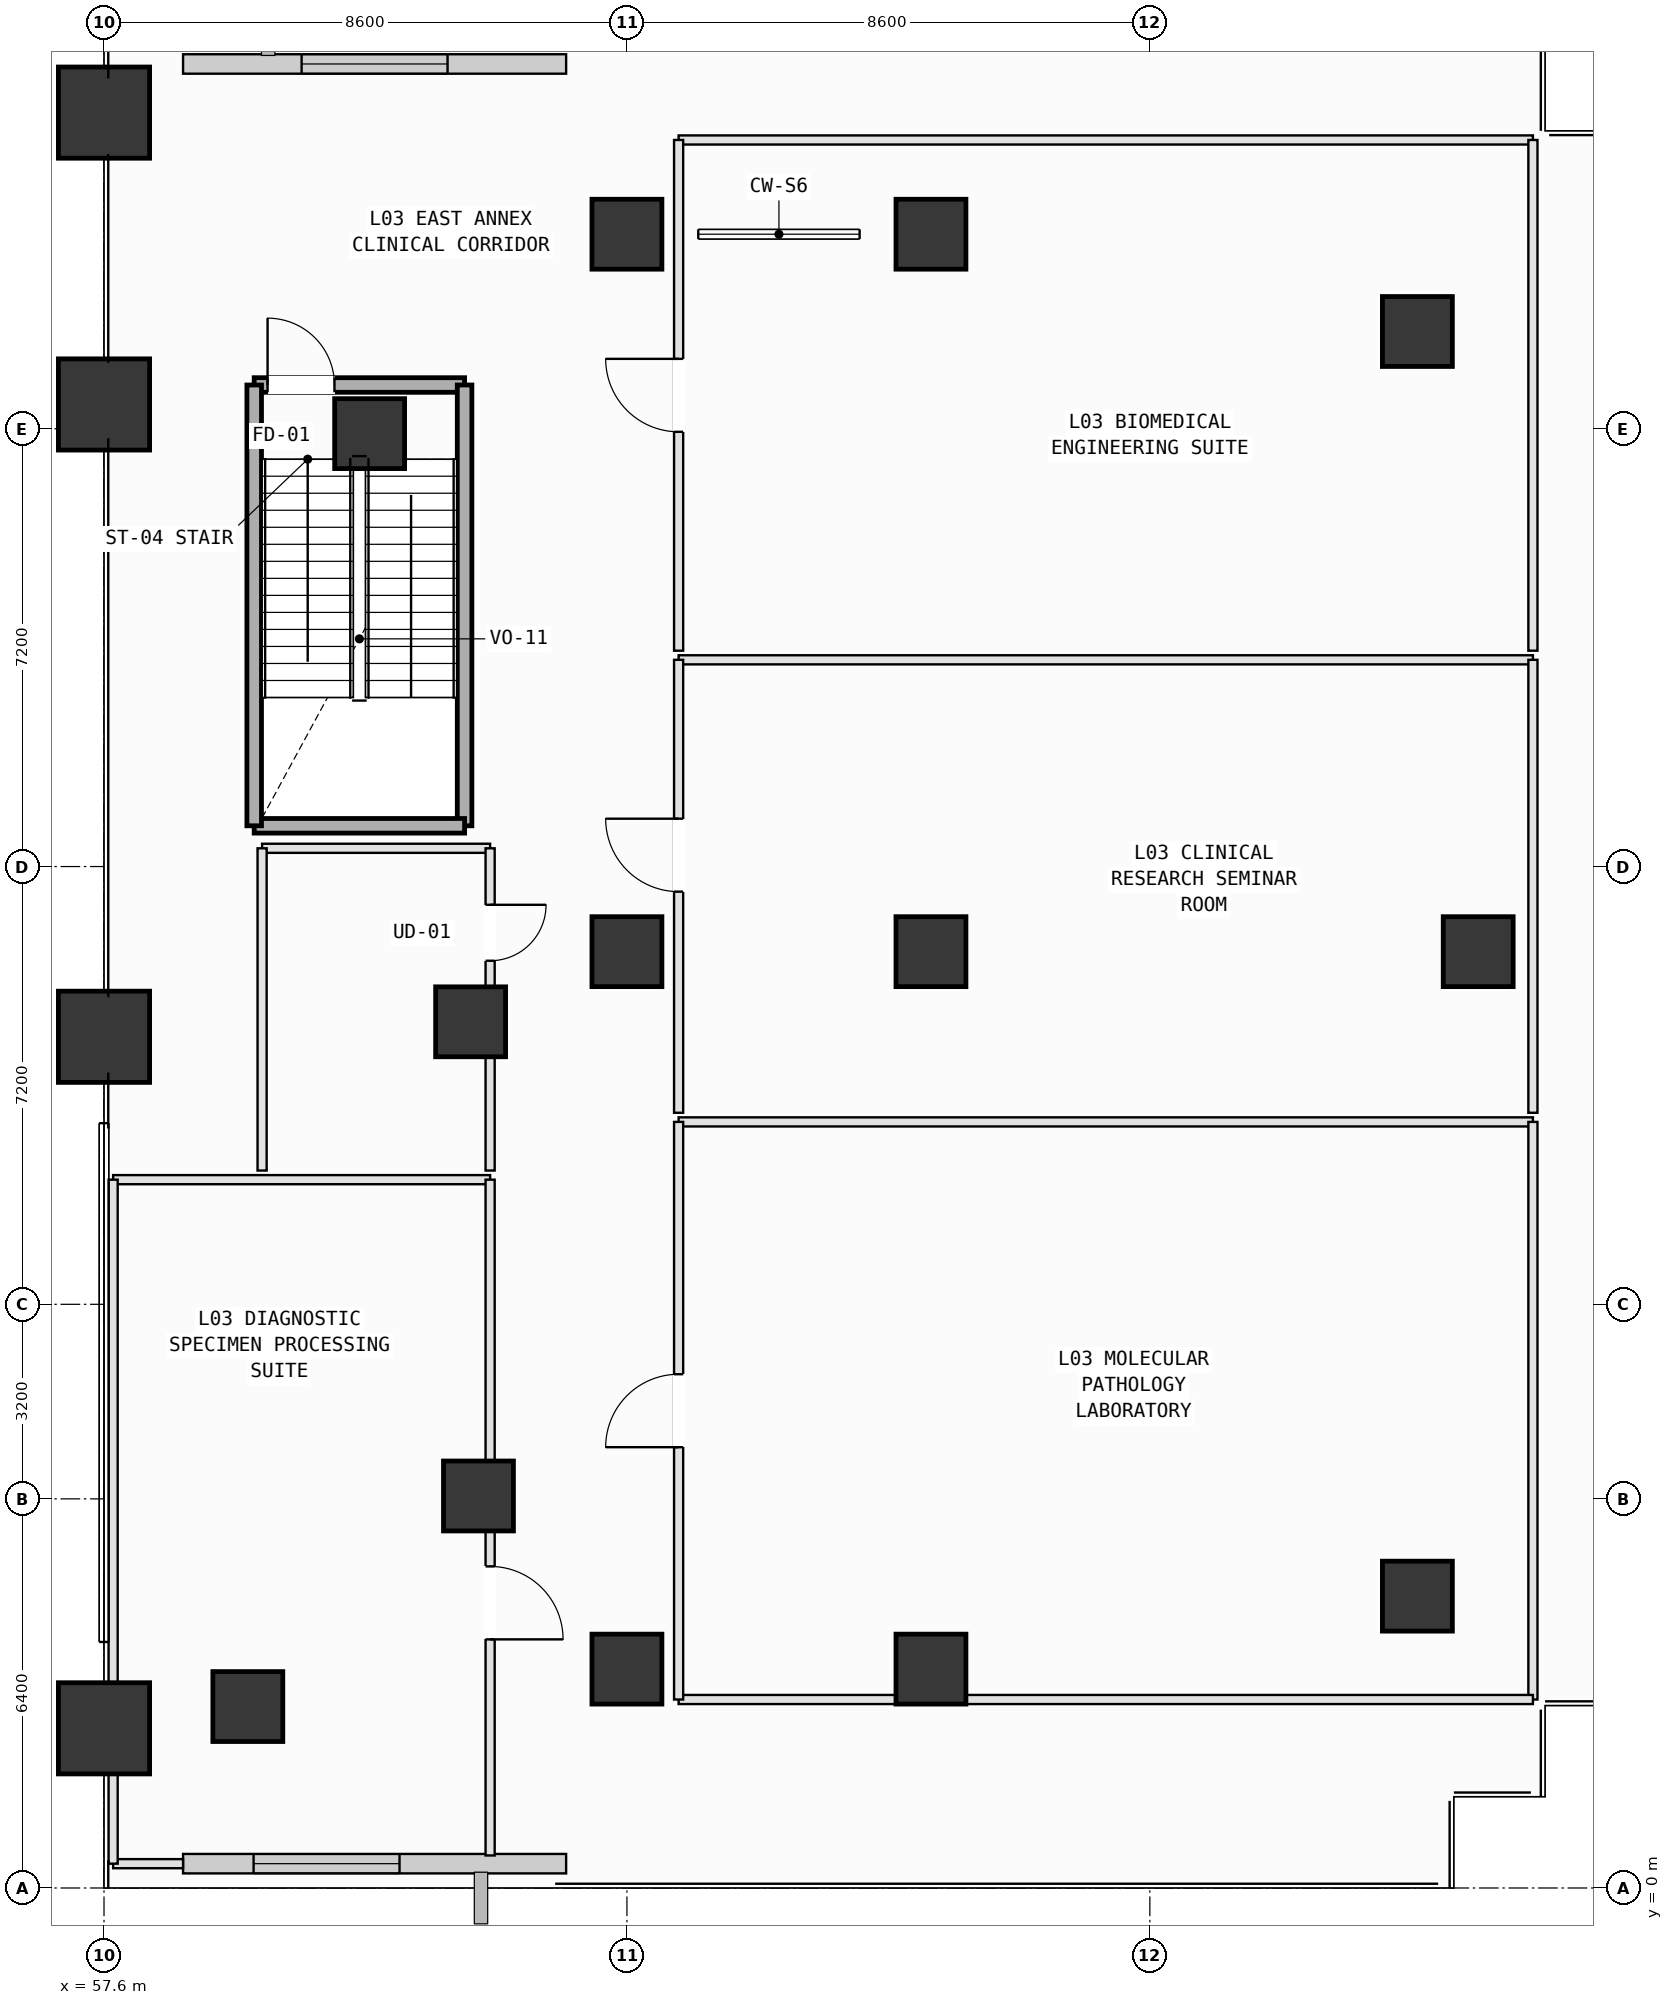
"""IFC4 building model, lengths in metres.
Left out: names, types, materials, properties, quantities, classifications, styles, units other than length and angle.
Written with IfcOpenShell. Run it as: python <this file> out.ifc"""

import sys

from ifc_helpers import new_model, si_unit, direction, frame, frame_2d, origin, origin_2d, place, context, subcontext, project, spatial, rectangle, extrude, element, fill, save


model = new_model("IFC4")
c1 = context("Model", 3, precision=1e-05, world=origin(), true_north=direction((0.0, 1.0)))
c2 = subcontext(c1, "Body", "Model", "MODEL_VIEW")
j1 = project(units=[si_unit("LENGTHUNIT", "METRE"), si_unit("PLANEANGLEUNIT", "RADIAN")], contexts=[c1])
p1 = place(None, origin())
s1 = spatial("IfcSite", under=j1, at=p1, CompositionType="ELEMENT")
p2 = place(p1, origin())
s2 = spatial("IfcBuilding", under=s1, at=p2, CompositionType="ELEMENT")
p3 = place(p2, frame((0.0, 0.0, 16.2)))
s3 = spatial("IfcBuildingStorey", under=s2, at=p3, CompositionType="ELEMENT", Elevation=16.2)
for number, where, z_axis, x_axis in (
    (1, (57.6, 2.626, 0.0), (0.0, 0.0, 1.0), (1.0, 0.0, 0.0)),
    (2, (57.6, 14.0, 0.0), (0.0, 0.0, 1.0), (1.0, 0.0, 0.0)),
    (3, (57.6, 24.4, 0.0), (0.0, 0.0, 1.0), (1.0, 0.0, 0.0)),
    (4, (57.6, 29.2, 0.0), (0.0, 0.0, 1.0), (1.0, 0.0, 0.0)),
):
    element("IfcColumn", number, at=place(p3, frame(where, z_axis=z_axis, x_axis=x_axis)), inside=s3, PredefinedType="PILASTER", context=c2, shape_type="SweptSolid", body=[
        extrude(rectangle(XDim=1.5, YDim=1.5, at=origin_2d()), origin(), (0.0, 0.0, 1.0), 5.4),
    ])
for number, where, z_axis, x_axis in (
    (5, (59.965, 2.984, 0.0), (0.0, 0.0, 1.0), (1.0, 0.0, 0.0)),
    (6, (63.758, 6.448, 0.0), (0.0, 0.0, 1.0), (1.0, 0.0, 0.0)),
    (7, (63.629, 14.246, 0.0), (0.0, 0.0, 1.0), (1.0, 0.0, 0.0)),
    (8, (61.969, 23.92, 0.0), (0.0, 0.0, 1.0), (1.0, 0.0, 0.0)),
    (9, (66.2, 3.6, 0.0), (0.0, 0.0, 1.0), (1.0, 0.0, 0.0)),
    (10, (71.2, 3.6, 0.0), (0.0, 0.0, 1.0), (1.0, 0.0, 0.0)),
    (11, (66.2, 15.4, 0.0), (0.0, 0.0, 1.0), (1.0, 0.0, 0.0)),
    (12, (71.2, 15.4, 0.0), (0.0, 0.0, 1.0), (1.0, 0.0, 0.0)),
    (13, (66.2, 27.2, 0.0), (0.0, 0.0, 1.0), (1.0, 0.0, 0.0)),
    (14, (71.2, 27.2, 0.0), (0.0, 0.0, 1.0), (1.0, 0.0, 0.0)),
    (15, (79.2, 4.8, 0.0), (0.0, 0.0, 1.0), (1.0, 0.0, 0.0)),
    (16, (80.2, 15.4, 0.0), (0.0, 0.0, 1.0), (1.0, 0.0, 0.0)),
    (17, (79.2, 25.6, 0.0), (0.0, 0.0, 1.0), (1.0, 0.0, 0.0)),
):
    element("IfcColumn", number, at=place(p3, frame(where, z_axis=z_axis, x_axis=x_axis)), inside=s3, PredefinedType="COLUMN", context=c2, shape_type="SweptSolid", body=[
        extrude(rectangle(XDim=1.15, YDim=1.15, at=origin_2d()), origin(), (0.0, 0.0, 1.0), 5.4),
    ])
p4 = place(p3, frame((65.2, 0.4, 0.0), z_axis=(0.0, 0.0, 1.0), x_axis=(-1.0, 0.0, 0.0)))
e18 = element("IfcWall", 18, at=p4, inside=s3, PredefinedType="SOLIDWALL", context=c2, shape_type="SweptSolid", body=[
    extrude(rectangle(XDim=6.3, YDim=0.32, at=frame_2d((3.15, 0.0))), origin(), (0.0, 0.0, 1.0), 4.23),
])
p5 = place(p4, frame((2.74, 0.0, 0.8)))
e19 = element("IfcOpeningElement", 19, at=p5, cuts=e18, PredefinedType="OPENING", context=c2, shape_type="SweptSolid", body=[
    extrude(rectangle(XDim=2.4, YDim=2.2, at=frame_2d((1.2, 1.1))), frame((0.0, 0.17, 0.0), z_axis=(0.0, -1.0, 0.0), x_axis=(1.0, 0.0, 0.0)), (0.0, 0.0, 1.0), 0.34),
])
p6 = place(p3, frame((58.9, 30.0, 0.0), z_axis=(0.0, 0.0, 1.0), x_axis=(1.0, 0.0, 0.0)))
e20 = element("IfcWall", 20, at=p6, inside=s3, PredefinedType="SOLIDWALL", context=c2, shape_type="SweptSolid", body=[
    extrude(rectangle(XDim=6.3, YDim=0.32, at=frame_2d((3.15, 0.0))), origin(), (0.0, 0.0, 1.0), 4.23),
])
p7 = place(p6, frame((1.95, 0.0, 0.8)))
e21 = element("IfcOpeningElement", 21, at=p7, cuts=e20, PredefinedType="OPENING", context=c2, shape_type="SweptSolid", body=[
    extrude(rectangle(XDim=2.4, YDim=2.2, at=frame_2d((1.2, 1.1))), frame((0.0, 0.17, 0.0), z_axis=(0.0, -1.0, 0.0), x_axis=(1.0, 0.0, 0.0)), (0.0, 0.0, 1.0), 0.34),
])
p8 = place(p3, frame((60.07, 24.72, 0.0), z_axis=(0.0, 0.0, 1.0), x_axis=(1.0, 0.0, 0.0)))
e22 = element("IfcWall", 22, at=p8, inside=s3, PredefinedType="SOLIDWALL", context=c2, shape_type="SweptSolid", body=[
    extrude(rectangle(XDim=3.46, YDim=0.24, at=frame_2d((1.73, 0.0))), origin(), (0.0, 0.0, 1.0), 5.15),
])
p9 = place(p8, frame((0.22, 0.0, 0.0)))
e23 = element("IfcOpeningElement", 23, at=p9, cuts=e22, PredefinedType="OPENING", context=c2, shape_type="SweptSolid", body=[
    extrude(rectangle(XDim=1.1, YDim=2.15, at=frame_2d((0.55, 1.075))), frame((0.0, 0.13, 0.0), z_axis=(0.0, -1.0, 0.0), x_axis=(1.0, 0.0, 0.0)), (0.0, 0.0, 1.0), 0.26),
])
p10 = place(p3, frame((63.53, 24.72, 0.0), z_axis=(0.0, 0.0, 1.0), x_axis=(0.0, -1.0, 0.0)))
e24 = element("IfcWall", 24, at=p10, inside=s3, PredefinedType="SOLIDWALL", context=c2, shape_type="SweptSolid", body=[
    extrude(rectangle(XDim=7.25, YDim=0.24, at=frame_2d((3.625, 0.0))), origin(), (0.0, 0.0, 1.0), 5.15),
])
p11 = place(p3, frame((63.53, 17.47, 0.0), z_axis=(0.0, 0.0, 1.0), x_axis=(-1.0, 0.0, 0.0)))
e25 = element("IfcWall", 25, at=p11, inside=s3, PredefinedType="SOLIDWALL", context=c2, shape_type="SweptSolid", body=[
    extrude(rectangle(XDim=3.46, YDim=0.24, at=frame_2d((1.73, 0.0))), origin(), (0.0, 0.0, 1.0), 5.15),
])
p12 = place(p3, frame((60.07, 17.47, 0.0), z_axis=(0.0, 0.0, 1.0), x_axis=(0.0, 1.0, 0.0)))
e26 = element("IfcWall", 26, at=p12, inside=s3, PredefinedType="SOLIDWALL", context=c2, shape_type="SweptSolid", body=[
    extrude(rectangle(XDim=7.25, YDim=0.24, at=frame_2d((3.625, 0.0))), origin(), (0.0, 0.0, 1.0), 5.15),
])
p13 = place(p3, frame((67.05, 12.6, 0.0), z_axis=(0.0, 0.0, 1.0), x_axis=(1.0, 0.0, 0.0)))
e27 = element("IfcWall", 27, at=p13, inside=s3, PredefinedType="PARTITIONING", context=c2, shape_type="SweptSolid", body=[
    extrude(rectangle(XDim=14.05, YDim=0.15, at=frame_2d((7.025, 0.0))), origin(), (0.0, 0.0, 1.0), 5.15),
])
p14 = place(p3, frame((81.1, 12.6, 0.0), z_axis=(0.0, 0.0, 1.0), x_axis=(0.0, -1.0, 0.0)))
e28 = element("IfcWall", 28, at=p14, inside=s3, PredefinedType="PARTITIONING", context=c2, shape_type="SweptSolid", body=[
    extrude(rectangle(XDim=9.5, YDim=0.15, at=frame_2d((4.75, 0.0))), origin(), (0.0, 0.0, 1.0), 5.15),
])
p15 = place(p3, frame((81.1, 3.1, 0.0), z_axis=(0.0, 0.0, 1.0), x_axis=(-1.0, 0.0, 0.0)))
e29 = element("IfcWall", 29, at=p15, inside=s3, PredefinedType="PARTITIONING", context=c2, shape_type="SweptSolid", body=[
    extrude(rectangle(XDim=14.05, YDim=0.15, at=frame_2d((7.025, 0.0))), origin(), (0.0, 0.0, 1.0), 4.235),
])
p16 = place(p3, frame((67.05, 3.1, 0.0), z_axis=(0.0, 0.0, 1.0), x_axis=(0.0, 1.0, 0.0)))
e30 = element("IfcWall", 30, at=p16, inside=s3, PredefinedType="PARTITIONING", context=c2, shape_type="SweptSolid", body=[
    extrude(rectangle(XDim=9.5, YDim=0.15, at=frame_2d((4.75, 0.0))), origin(), (0.0, 0.0, 1.0), 5.15),
])
p17 = place(p16, frame((4.15, 0.0, 0.0)))
e31 = element("IfcOpeningElement", 31, at=p17, cuts=e30, PredefinedType="OPENING", context=c2, shape_type="SweptSolid", body=[
    extrude(rectangle(XDim=1.2, YDim=2.15, at=frame_2d((0.6, 1.075))), frame((0.0, 0.085, 0.0), z_axis=(0.0, -1.0, 0.0), x_axis=(1.0, 0.0, 0.0)), (0.0, 0.0, 1.0), 0.17),
])
p18 = place(p3, frame((67.05, 20.2, 0.0), z_axis=(0.0, 0.0, 1.0), x_axis=(1.0, 0.0, 0.0)))
e32 = element("IfcWall", 32, at=p18, inside=s3, PredefinedType="PARTITIONING", context=c2, shape_type="SweptSolid", body=[
    extrude(rectangle(XDim=14.05, YDim=0.15, at=frame_2d((7.025, 0.0))), origin(), (0.0, 0.0, 1.0), 5.15),
])
p19 = place(p3, frame((81.1, 20.2, 0.0), z_axis=(0.0, 0.0, 1.0), x_axis=(0.0, -1.0, 0.0)))
e33 = element("IfcWall", 33, at=p19, inside=s3, PredefinedType="PARTITIONING", context=c2, shape_type="SweptSolid", body=[
    extrude(rectangle(XDim=7.45, YDim=0.15, at=frame_2d((3.725, 0.0))), origin(), (0.0, 0.0, 1.0), 5.15),
])
p20 = place(p3, frame((67.05, 12.75, 0.0), z_axis=(0.0, 0.0, 1.0), x_axis=(0.0, 1.0, 0.0)))
e34 = element("IfcWall", 34, at=p20, inside=s3, PredefinedType="PARTITIONING", context=c2, shape_type="SweptSolid", body=[
    extrude(rectangle(XDim=7.45, YDim=0.15, at=frame_2d((3.725, 0.0))), origin(), (0.0, 0.0, 1.0), 5.15),
])
p21 = place(p20, frame((3.637, 0.0, 0.0)))
e35 = element("IfcOpeningElement", 35, at=p21, cuts=e34, PredefinedType="OPENING", context=c2, shape_type="SweptSolid", body=[
    extrude(rectangle(XDim=1.2, YDim=2.15, at=frame_2d((0.6, 1.075))), frame((0.0, 0.085, 0.0), z_axis=(0.0, -1.0, 0.0), x_axis=(1.0, 0.0, 0.0)), (0.0, 0.0, 1.0), 0.17),
])
p22 = place(p3, frame((67.05, 28.75, 0.0), z_axis=(0.0, 0.0, 1.0), x_axis=(1.0, 0.0, 0.0)))
e36 = element("IfcWall", 36, at=p22, inside=s3, PredefinedType="PARTITIONING", context=c2, shape_type="SweptSolid", body=[
    extrude(rectangle(XDim=14.05, YDim=0.15, at=frame_2d((7.025, 0.0))), origin(), (0.0, 0.0, 1.0), 5.15),
])
p23 = place(p3, frame((81.1, 28.75, 0.0), z_axis=(0.0, 0.0, 1.0), x_axis=(0.0, -1.0, 0.0)))
e37 = element("IfcWall", 37, at=p23, inside=s3, PredefinedType="PARTITIONING", context=c2, shape_type="SweptSolid", body=[
    extrude(rectangle(XDim=8.4, YDim=0.15, at=frame_2d((4.2, 0.0))), origin(), (0.0, 0.0, 1.0), 5.15),
])
p24 = place(p3, frame((67.05, 20.35, 0.0), z_axis=(0.0, 0.0, 1.0), x_axis=(0.0, 1.0, 0.0)))
e38 = element("IfcWall", 38, at=p24, inside=s3, PredefinedType="PARTITIONING", context=c2, shape_type="SweptSolid", body=[
    extrude(rectangle(XDim=8.4, YDim=0.15, at=frame_2d((4.2, 0.0))), origin(), (0.0, 0.0, 1.0), 5.15),
])
p25 = place(p24, frame((3.6, 0.0, 0.0)))
e39 = element("IfcOpeningElement", 39, at=p25, cuts=e38, PredefinedType="OPENING", context=c2, shape_type="SweptSolid", body=[
    extrude(rectangle(XDim=1.2, YDim=2.15, at=frame_2d((0.6, 1.075))), frame((0.0, 0.085, 0.0), z_axis=(0.0, -1.0, 0.0), x_axis=(1.0, 0.0, 0.0)), (0.0, 0.0, 1.0), 0.17),
])
p26 = place(p3, frame((57.75, 11.65, 0.0), z_axis=(0.0, 0.0, 1.0), x_axis=(1.0, 0.0, 0.0)))
e40 = element("IfcWall", 40, at=p26, inside=s3, PredefinedType="PARTITIONING", context=c2, shape_type="SweptSolid", body=[
    extrude(rectangle(XDim=6.2, YDim=0.15, at=frame_2d((3.1, 0.0))), origin(), (0.0, 0.0, 1.0), 5.15),
])
p27 = place(p3, frame((63.95, 11.65, 0.0), z_axis=(0.0, 0.0, 1.0), x_axis=(0.0, -1.0, 0.0)))
e41 = element("IfcWall", 41, at=p27, inside=s3, PredefinedType="PARTITIONING", context=c2, shape_type="SweptSolid", body=[
    extrude(rectangle(XDim=11.115, YDim=0.15, at=frame_2d((5.558, 0.0))), origin(), (0.0, 0.0, 1.0), 4.235),
])
p28 = place(p27, frame((6.361, 0.0, 0.0)))
e42 = element("IfcOpeningElement", 42, at=p28, cuts=e41, PredefinedType="OPENING", context=c2, shape_type="SweptSolid", body=[
    extrude(rectangle(XDim=1.2, YDim=2.15, at=frame_2d((0.6, 1.075))), frame((0.0, 0.085, 0.0), z_axis=(0.0, -1.0, 0.0), x_axis=(1.0, 0.0, 0.0)), (0.0, 0.0, 1.0), 0.17),
])
p29 = place(p3, frame((58.9, 0.4, 0.0), z_axis=(0.0, 0.0, 1.0), x_axis=(-1.0, 0.0, 0.0)))
e43 = element("IfcWall", 43, at=p29, inside=s3, PredefinedType="PARTITIONING", context=c2, shape_type="SweptSolid", body=[
    extrude(rectangle(XDim=1.15, YDim=0.15, at=frame_2d((0.575, 0.0))), origin(), (0.0, 0.0, 1.0), 5.15),
])
p30 = place(p3, frame((57.75, 0.4, 0.0), z_axis=(0.0, 0.0, 1.0), x_axis=(0.0, 1.0, 0.0)))
e44 = element("IfcWall", 44, at=p30, inside=s3, PredefinedType="PARTITIONING", context=c2, shape_type="SweptSolid", body=[
    extrude(rectangle(XDim=11.25, YDim=0.15, at=frame_2d((5.625, 0.0))), origin(), (0.0, 0.0, 1.0), 4.235),
])
p31 = place(p3, frame((60.2, 17.1, 0.0), z_axis=(0.0, 0.0, 1.0), x_axis=(1.0, 0.0, 0.0)))
e45 = element("IfcWall", 45, at=p31, inside=s3, PredefinedType="PARTITIONING", context=c2, shape_type="SweptSolid", body=[
    extrude(rectangle(XDim=3.75, YDim=0.15, at=frame_2d((1.875, 0.0))), origin(), (0.0, 0.0, 1.0), 5.15),
])
p32 = place(p3, frame((63.95, 17.1, 0.0), z_axis=(0.0, 0.0, 1.0), x_axis=(0.0, -1.0, 0.0)))
e46 = element("IfcWall", 46, at=p32, inside=s3, PredefinedType="PARTITIONING", context=c2, shape_type="SweptSolid", body=[
    extrude(rectangle(XDim=5.3, YDim=0.15, at=frame_2d((2.65, 0.0))), origin(), (0.0, 0.0, 1.0), 4.235),
])
p33 = place(p32, frame((0.929, 0.0, 0.0)))
e47 = element("IfcOpeningElement", 47, at=p33, cuts=e46, PredefinedType="OPENING", context=c2, shape_type="SweptSolid", body=[
    extrude(rectangle(XDim=0.92, YDim=2.1, at=frame_2d((0.46, 1.05))), frame((0.0, 0.085, 0.0), z_axis=(0.0, -1.0, 0.0), x_axis=(1.0, 0.0, 0.0)), (0.0, 0.0, 1.0), 0.17),
])
p34 = place(p3, frame((60.2, 11.8, 0.0), z_axis=(0.0, 0.0, 1.0), x_axis=(0.0, 1.0, 0.0)))
e48 = element("IfcWall", 48, at=p34, inside=s3, PredefinedType="PARTITIONING", context=c2, shape_type="SweptSolid", body=[
    extrude(rectangle(XDim=5.3, YDim=0.15, at=frame_2d((2.65, 0.0))), origin(), (0.0, 0.0, 1.0), 5.15),
])
p35 = place(p5, origin())
e49 = element("IfcWindow", 49, at=p35, inside=s3, PartitioningType="SINGLE_PANEL", PredefinedType="WINDOW", context=c2, shape_type="SweptSolid", body=[
    extrude(rectangle(XDim=2.4, YDim=2.2, at=frame_2d((1.2, 1.1))), frame((0.0, 0.03, 0.0), z_axis=(0.0, -1.0, 0.0), x_axis=(1.0, 0.0, 0.0)), (0.0, 0.0, 1.0), 0.06),
])
fill(e19, e49)
p36 = place(p7, origin())
e50 = element("IfcWindow", 50, at=p36, inside=s3, PartitioningType="SINGLE_PANEL", PredefinedType="WINDOW", context=c2, shape_type="SweptSolid", body=[
    extrude(rectangle(XDim=2.4, YDim=2.2, at=frame_2d((1.2, 1.1))), frame((0.0, 0.03, 0.0), z_axis=(0.0, -1.0, 0.0), x_axis=(1.0, 0.0, 0.0)), (0.0, 0.0, 1.0), 0.06),
])
fill(e21, e50)
p37 = place(p9, origin())
e51 = element("IfcDoor", 51, at=p37, inside=s3, OperationType="SINGLE_SWING_LEFT", PredefinedType="DOOR", context=c2, shape_type="SweptSolid", body=[
    extrude(rectangle(XDim=1.1, YDim=2.15, at=frame_2d((0.55, 1.075))), frame((0.0, 0.025, 0.0), z_axis=(0.0, -1.0, 0.0), x_axis=(1.0, 0.0, 0.0)), (0.0, 0.0, 1.0), 0.05),
])
fill(e23, e51)
p38 = place(p17, origin())
e52 = element("IfcDoor", 52, at=p38, inside=s3, OperationType="SINGLE_SWING_LEFT", PredefinedType="DOOR", context=c2, shape_type="SweptSolid", body=[
    extrude(rectangle(XDim=1.2, YDim=2.15, at=frame_2d((0.6, 1.075))), frame((0.0, 0.025, 0.0), z_axis=(0.0, -1.0, 0.0), x_axis=(1.0, 0.0, 0.0)), (0.0, 0.0, 1.0), 0.05),
])
fill(e31, e52)
p39 = place(p21, origin())
e53 = element("IfcDoor", 53, at=p39, inside=s3, OperationType="SINGLE_SWING_RIGHT", PredefinedType="DOOR", context=c2, shape_type="SweptSolid", body=[
    extrude(rectangle(XDim=1.2, YDim=2.15, at=frame_2d((0.6, 1.075))), frame((0.0, 0.025, 0.0), z_axis=(0.0, -1.0, 0.0), x_axis=(1.0, 0.0, 0.0)), (0.0, 0.0, 1.0), 0.05),
])
fill(e35, e53)
p40 = place(p25, origin())
e54 = element("IfcDoor", 54, at=p40, inside=s3, OperationType="SINGLE_SWING_RIGHT", PredefinedType="DOOR", context=c2, shape_type="SweptSolid", body=[
    extrude(rectangle(XDim=1.2, YDim=2.15, at=frame_2d((0.6, 1.075))), frame((0.0, 0.025, 0.0), z_axis=(0.0, -1.0, 0.0), x_axis=(1.0, 0.0, 0.0)), (0.0, 0.0, 1.0), 0.05),
])
fill(e39, e54)
p41 = place(p28, origin())
e55 = element("IfcDoor", 55, at=p41, inside=s3, OperationType="SINGLE_SWING_RIGHT", PredefinedType="DOOR", context=c2, shape_type="SweptSolid", body=[
    extrude(rectangle(XDim=1.2, YDim=2.15, at=frame_2d((0.6, 1.075))), frame((0.0, 0.025, 0.0), z_axis=(0.0, -1.0, 0.0), x_axis=(1.0, 0.0, 0.0)), (0.0, 0.0, 1.0), 0.05),
])
fill(e42, e55)
p42 = place(p33, origin())
e56 = element("IfcDoor", 56, at=p42, inside=s3, OperationType="SINGLE_SWING_LEFT", PredefinedType="DOOR", context=c2, shape_type="SweptSolid", body=[
    extrude(rectangle(XDim=0.92, YDim=2.1, at=frame_2d((0.46, 1.05))), frame((0.0, 0.025, 0.0), z_axis=(0.0, -1.0, 0.0), x_axis=(1.0, 0.0, 0.0)), (0.0, 0.0, 1.0), 0.05),
])
fill(e47, e56)
save(model, sys.argv[1])
